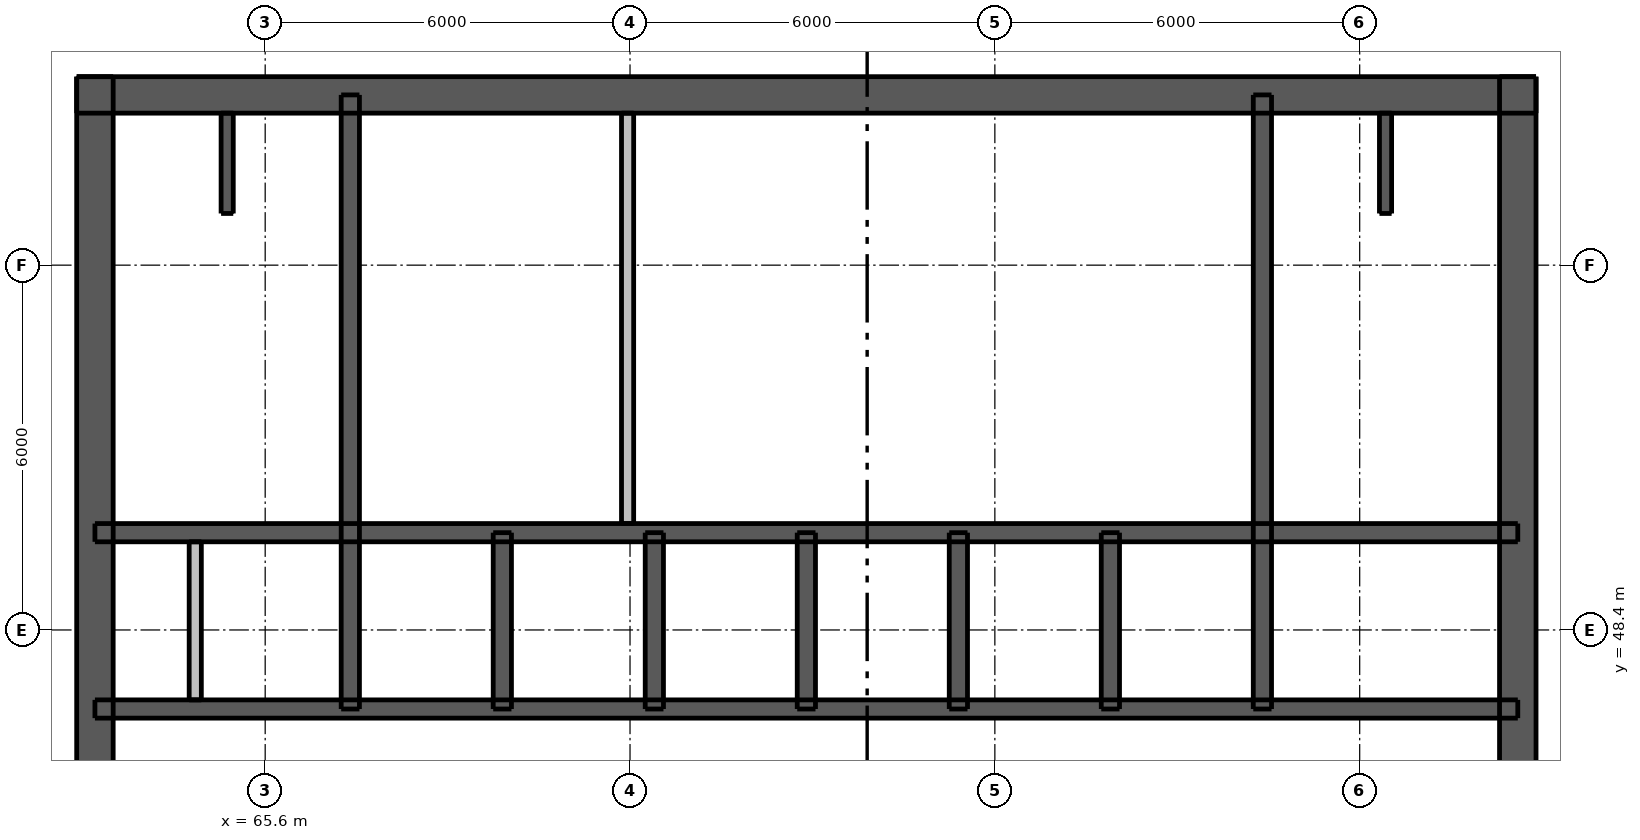
"""IFC4 building model, lengths in metres.
Left out: names, types, materials, properties, quantities, classifications, styles, units other than length and angle.
Written with IfcOpenShell. Run it as: python <this file> out.ifc"""

import sys

from ifc_helpers import new_model, si_unit, direction, frame, frame_2d, origin, place, context, subcontext, project, spatial, rectangle, extrude, element, fill, save


model = new_model("IFC4")
c1 = context("Model", 3, precision=1e-05, world=origin(), true_north=direction((0.0, 1.0)))
c2 = subcontext(c1, "Body", "Model", "MODEL_VIEW")
j1 = project(units=[si_unit("LENGTHUNIT", "METRE"), si_unit("PLANEANGLEUNIT", "RADIAN")], contexts=[c1])
p1 = place(None, origin())
s1 = spatial("IfcSite", under=j1, at=p1, CompositionType="ELEMENT")
p2 = place(p1, origin())
s2 = spatial("IfcBuilding", under=s1, at=p2, CompositionType="ELEMENT")
p3 = place(p2, frame((0.0, 0.0, 229.9)))
s3 = spatial("IfcBuildingStorey", under=s2, at=p3, CompositionType="ELEMENT", Elevation=229.9)
p4 = place(p3, frame((62.5, 57.2, 0.0), z_axis=(0.0, 0.0, 1.0), x_axis=(1.0, 0.0, 0.0)))
e1 = element("IfcWall", 1, at=p4, inside=s3, PredefinedType="SHEAR", context=c2, shape_type="SweptSolid", body=[
    extrude(rectangle(XDim=24.0, YDim=0.6, at=frame_2d((12.0, 0.0))), origin(), (0.0, 0.0, 1.0), 8.75),
])
p5 = place(p4, frame((19.85, 0.0, 0.0)))
e2 = element("IfcOpeningElement", 2, at=p5, cuts=e1, PredefinedType="OPENING", context=c2, shape_type="SweptSolid", body=[
    extrude(rectangle(XDim=1.1, YDim=2.1, at=frame_2d((0.55, 1.05))), frame((0.0, 0.31, 0.0), z_axis=(0.0, -1.0, 0.0), x_axis=(1.0, 0.0, 0.0)), (0.0, 0.0, 1.0), 0.62),
])
p6 = place(p4, frame((22.1, 0.0, 0.0)))
e3 = element("IfcOpeningElement", 3, at=p6, cuts=e1, PredefinedType="OPENING", context=c2, shape_type="SweptSolid", body=[
    extrude(rectangle(XDim=1.1, YDim=2.1, at=frame_2d((0.55, 1.05))), frame((0.0, 0.31, 0.0), z_axis=(0.0, -1.0, 0.0), x_axis=(1.0, 0.0, 0.0)), (0.0, 0.0, 1.0), 0.62),
])
p7 = place(p4, frame((0.8, 0.0, 0.0)))
e4 = element("IfcOpeningElement", 4, at=p7, cuts=e1, PredefinedType="OPENING", context=c2, shape_type="SweptSolid", body=[
    extrude(rectangle(XDim=1.1, YDim=2.1, at=frame_2d((0.55, 1.05))), frame((0.0, 0.31, 0.0), z_axis=(0.0, -1.0, 0.0), x_axis=(1.0, 0.0, 0.0)), (0.0, 0.0, 1.0), 0.62),
])
p8 = place(p4, frame((3.05, 0.0, 0.0)))
e5 = element("IfcOpeningElement", 5, at=p8, cuts=e1, PredefinedType="OPENING", context=c2, shape_type="SweptSolid", body=[
    extrude(rectangle(XDim=1.1, YDim=2.1, at=frame_2d((0.55, 1.05))), frame((0.0, 0.31, 0.0), z_axis=(0.0, -1.0, 0.0), x_axis=(1.0, 0.0, 0.0)), (0.0, 0.0, 1.0), 0.62),
])
p9 = place(p4, frame((6.405, 0.0, 0.0)))
e6 = element("IfcOpeningElement", 6, at=p9, cuts=e1, PredefinedType="OPENING", context=c2, shape_type="SweptSolid", body=[
    extrude(rectangle(XDim=0.9, YDim=2.1, at=frame_2d((0.45, 1.05))), frame((0.0, 0.31, 0.0), z_axis=(0.0, -1.0, 0.0), x_axis=(1.0, 0.0, 0.0)), (0.0, 0.0, 1.0), 0.62),
])
p10 = place(p4, frame((13.21, 0.0, 0.0)))
e7 = element("IfcOpeningElement", 7, at=p10, cuts=e1, PredefinedType="OPENING", context=c2, shape_type="SweptSolid", body=[
    extrude(rectangle(XDim=0.9, YDim=2.1, at=frame_2d((0.45, 1.05))), frame((0.0, 0.31, 0.0), z_axis=(0.0, -1.0, 0.0), x_axis=(1.0, 0.0, 0.0)), (0.0, 0.0, 1.0), 0.62),
])
p11 = place(p3, frame((62.8, 33.5, 0.0), z_axis=(0.0, 0.0, 1.0), x_axis=(0.0, 1.0, 0.0)))
e8 = element("IfcWall", 8, at=p11, inside=s3, PredefinedType="SHEAR", context=c2, shape_type="SweptSolid", body=[
    extrude(rectangle(XDim=24.0, YDim=0.6, at=frame_2d((12.0, 0.0))), origin(), (0.0, 0.0, 1.0), 8.75),
])
p12 = place(p11, frame((11.2, 0.0, 0.0)))
e9 = element("IfcOpeningElement", 9, at=p12, cuts=e8, PredefinedType="OPENING", context=c2, shape_type="SweptSolid", body=[
    extrude(rectangle(XDim=1.6, YDim=2.1, at=frame_2d((0.8, 1.05))), frame((0.0, 0.31, 0.0), z_axis=(0.0, -1.0, 0.0), x_axis=(1.0, 0.0, 0.0)), (0.0, 0.0, 1.0), 0.62),
])
p13 = place(p3, frame((86.2, 33.5, 0.0), z_axis=(0.0, 0.0, 1.0), x_axis=(0.0, 1.0, 0.0)))
e10 = element("IfcWall", 10, at=p13, inside=s3, PredefinedType="SHEAR", context=c2, shape_type="SweptSolid", body=[
    extrude(rectangle(XDim=24.0, YDim=0.6, at=frame_2d((12.0, 0.0))), origin(), (0.0, 0.0, 1.0), 8.75),
])
p14 = place(p13, frame((11.2, 0.0, 0.0)))
e11 = element("IfcOpeningElement", 11, at=p14, cuts=e10, PredefinedType="OPENING", context=c2, shape_type="SweptSolid", body=[
    extrude(rectangle(XDim=1.6, YDim=2.1, at=frame_2d((0.8, 1.05))), frame((0.0, 0.31, 0.0), z_axis=(0.0, -1.0, 0.0), x_axis=(1.0, 0.0, 0.0)), (0.0, 0.0, 1.0), 0.62),
])
p15 = place(p3, frame((62.8, 47.1, 0.0), z_axis=(0.0, 0.0, 1.0), x_axis=(1.0, 0.0, 0.0)))
e12 = element("IfcWall", 12, at=p15, inside=s3, PredefinedType="SHEAR", context=c2, shape_type="SweptSolid", body=[
    extrude(rectangle(XDim=23.4, YDim=0.3, at=frame_2d((11.7, 0.0))), origin(), (0.0, 0.0, 1.0), 8.75),
])
p16 = place(p15, frame((0.575, 0.0, 0.0)))
e13 = element("IfcOpeningElement", 13, at=p16, cuts=e12, PredefinedType="OPENING", context=c2, shape_type="SweptSolid", body=[
    extrude(rectangle(XDim=0.8, YDim=2.1, at=frame_2d((0.4, 1.05))), frame((0.0, 0.16, 0.0), z_axis=(0.0, -1.0, 0.0), x_axis=(1.0, 0.0, 0.0)), (0.0, 0.0, 1.0), 0.32),
])
p17 = place(p15, frame((2.4, 0.0, 0.0)))
e14 = element("IfcOpeningElement", 14, at=p17, cuts=e12, PredefinedType="OPENING", context=c2, shape_type="SweptSolid", body=[
    extrude(rectangle(XDim=0.9, YDim=2.1, at=frame_2d((0.45, 1.05))), frame((0.0, 0.16, 0.0), z_axis=(0.0, -1.0, 0.0), x_axis=(1.0, 0.0, 0.0)), (0.0, 0.0, 1.0), 0.32),
])
p18 = place(p15, frame((20.775, 0.0, 0.0)))
e15 = element("IfcOpeningElement", 15, at=p18, cuts=e12, PredefinedType="OPENING", context=c2, shape_type="SweptSolid", body=[
    extrude(rectangle(XDim=0.9, YDim=2.1, at=frame_2d((0.45, 1.05))), frame((0.0, 0.16, 0.0), z_axis=(0.0, -1.0, 0.0), x_axis=(1.0, 0.0, 0.0)), (0.0, 0.0, 1.0), 0.32),
])
p19 = place(p15, frame((4.9, 0.0, 0.0)))
e16 = element("IfcOpeningElement", 16, at=p19, cuts=e12, PredefinedType="OPENING", context=c2, shape_type="SweptSolid", body=[
    extrude(rectangle(XDim=1.1, YDim=2.1, at=frame_2d((0.55, 1.05))), frame((0.0, 0.16, 0.0), z_axis=(0.0, -1.0, 0.0), x_axis=(1.0, 0.0, 0.0)), (0.0, 0.0, 1.0), 0.32),
])
p20 = place(p15, frame((7.4, 0.0, 0.0)))
e17 = element("IfcOpeningElement", 17, at=p20, cuts=e12, PredefinedType="OPENING", context=c2, shape_type="SweptSolid", body=[
    extrude(rectangle(XDim=1.1, YDim=2.1, at=frame_2d((0.55, 1.05))), frame((0.0, 0.16, 0.0), z_axis=(0.0, -1.0, 0.0), x_axis=(1.0, 0.0, 0.0)), (0.0, 0.0, 1.0), 0.32),
])
p21 = place(p15, frame((9.9, 0.0, 0.0)))
e18 = element("IfcOpeningElement", 18, at=p21, cuts=e12, PredefinedType="OPENING", context=c2, shape_type="SweptSolid", body=[
    extrude(rectangle(XDim=1.1, YDim=2.1, at=frame_2d((0.55, 1.05))), frame((0.0, 0.16, 0.0), z_axis=(0.0, -1.0, 0.0), x_axis=(1.0, 0.0, 0.0)), (0.0, 0.0, 1.0), 0.32),
])
p22 = place(p15, frame((12.4, 0.0, 0.0)))
e19 = element("IfcOpeningElement", 19, at=p22, cuts=e12, PredefinedType="OPENING", context=c2, shape_type="SweptSolid", body=[
    extrude(rectangle(XDim=1.1, YDim=2.1, at=frame_2d((0.55, 1.05))), frame((0.0, 0.16, 0.0), z_axis=(0.0, -1.0, 0.0), x_axis=(1.0, 0.0, 0.0)), (0.0, 0.0, 1.0), 0.32),
])
p23 = place(p15, frame((14.9, 0.0, 0.0)))
e20 = element("IfcOpeningElement", 20, at=p23, cuts=e12, PredefinedType="OPENING", context=c2, shape_type="SweptSolid", body=[
    extrude(rectangle(XDim=1.1, YDim=2.1, at=frame_2d((0.55, 1.05))), frame((0.0, 0.16, 0.0), z_axis=(0.0, -1.0, 0.0), x_axis=(1.0, 0.0, 0.0)), (0.0, 0.0, 1.0), 0.32),
])
p24 = place(p15, frame((17.4, 0.0, 0.0)))
e21 = element("IfcOpeningElement", 21, at=p24, cuts=e12, PredefinedType="OPENING", context=c2, shape_type="SweptSolid", body=[
    extrude(rectangle(XDim=1.1, YDim=2.1, at=frame_2d((0.55, 1.05))), frame((0.0, 0.16, 0.0), z_axis=(0.0, -1.0, 0.0), x_axis=(1.0, 0.0, 0.0)), (0.0, 0.0, 1.0), 0.32),
])
p25 = place(p3, frame((62.8, 50.0, 0.0), z_axis=(0.0, 0.0, 1.0), x_axis=(1.0, 0.0, 0.0)))
e22 = element("IfcWall", 22, at=p25, inside=s3, PredefinedType="SHEAR", context=c2, shape_type="SweptSolid", body=[
    extrude(rectangle(XDim=23.4, YDim=0.3, at=frame_2d((11.7, 0.0))), origin(), (0.0, 0.0, 1.0), 8.75),
])
for number, where, z_axis, x_axis in (
    (23, (67.0, 47.1, 0.0), (0.0, 0.0, 1.0), (0.0, 1.0, 0.0)),
    (24, (82.0, 47.1, 0.0), (0.0, 0.0, 1.0), (0.0, 1.0, 0.0)),
):
    element("IfcWall", number, at=place(p3, frame(where, z_axis=z_axis, x_axis=x_axis)), inside=s3, PredefinedType="SHEAR", context=c2, shape_type="SweptSolid", body=[
        extrude(rectangle(XDim=10.1, YDim=0.3, at=frame_2d((5.05, 0.0))), origin(), (0.0, 0.0, 1.0), 8.75),
    ])
for number, where, z_axis, x_axis in (
    (25, (69.5, 47.1, 0.0), (0.0, 0.0, 1.0), (0.0, 1.0, 0.0)),
    (26, (72.0, 47.1, 0.0), (0.0, 0.0, 1.0), (0.0, 1.0, 0.0)),
    (27, (74.5, 47.1, 0.0), (0.0, 0.0, 1.0), (0.0, 1.0, 0.0)),
    (28, (77.0, 47.1, 0.0), (0.0, 0.0, 1.0), (0.0, 1.0, 0.0)),
    (29, (79.5, 47.1, 0.0), (0.0, 0.0, 1.0), (0.0, 1.0, 0.0)),
):
    element("IfcWall", number, at=place(p3, frame(where, z_axis=z_axis, x_axis=x_axis)), inside=s3, PredefinedType="SHEAR", context=c2, shape_type="SweptSolid", body=[
        extrude(rectangle(XDim=2.9, YDim=0.3, at=frame_2d((1.45, 0.0))), origin(), (0.0, 0.0, 1.0), 8.75),
    ])
p26 = place(p3, frame((64.45, 47.25, 0.0), z_axis=(0.0, 0.0, 1.0), x_axis=(0.0, 1.0, 0.0)))
e30 = element("IfcWall", 30, at=p26, inside=s3, PredefinedType="PLUMBINGWALL", context=c2, shape_type="SweptSolid", body=[
    extrude(rectangle(XDim=2.6, YDim=0.2, at=frame_2d((1.3, 0.0))), origin(), (0.0, 0.0, 1.0), 8.75),
])
p27 = place(p3, frame((71.56, 50.15, 0.0), z_axis=(0.0, 0.0, 1.0), x_axis=(0.0, 1.0, 0.0)))
e31 = element("IfcWall", 31, at=p27, inside=s3, PredefinedType="PLUMBINGWALL", context=c2, shape_type="SweptSolid", body=[
    extrude(rectangle(XDim=6.75, YDim=0.2, at=frame_2d((3.375, 0.0))), origin(), (0.0, 0.0, 1.0), 8.75),
])
for number, where, z_axis, x_axis in (
    (32, (84.025, 56.9, 0.0), (0.0, 0.0, 1.0), (0.0, -1.0, 0.0)),
    (33, (64.975, 56.9, 0.0), (0.0, 0.0, 1.0), (0.0, -1.0, 0.0)),
):
    element("IfcWall", number, at=place(p3, frame(where, z_axis=z_axis, x_axis=x_axis)), inside=s3, PredefinedType="SHEAR", context=c2, shape_type="SweptSolid", body=[
        extrude(rectangle(XDim=1.65, YDim=0.2, at=frame_2d((0.825, 0.0))), origin(), (0.0, 0.0, 1.0), 8.75),
    ])
p28 = place(p5, origin())
e34 = element("IfcDoor", 34, at=p28, inside=s3, OperationType="SINGLE_SWING_RIGHT", PredefinedType="DOOR", context=c2, shape_type="SweptSolid", body=[
    extrude(rectangle(XDim=1.1, YDim=2.1, at=frame_2d((0.55, 1.05))), frame((0.0, -0.237, 0.0), z_axis=(0.0, -1.0, 0.0), x_axis=(1.0, 0.0, 0.0)), (0.0, 0.0, 1.0), 0.05),
])
fill(e2, e34)
p29 = place(p6, origin())
e35 = element("IfcDoor", 35, at=p29, inside=s3, OperationType="SINGLE_SWING_RIGHT", PredefinedType="DOOR", context=c2, shape_type="SweptSolid", body=[
    extrude(rectangle(XDim=1.1, YDim=2.1, at=frame_2d((0.55, 1.05))), frame((0.0, -0.237, 0.0), z_axis=(0.0, -1.0, 0.0), x_axis=(1.0, 0.0, 0.0)), (0.0, 0.0, 1.0), 0.05),
])
fill(e3, e35)
p30 = place(p7, origin())
e36 = element("IfcDoor", 36, at=p30, inside=s3, OperationType="SINGLE_SWING_LEFT", PredefinedType="DOOR", context=c2, shape_type="SweptSolid", body=[
    extrude(rectangle(XDim=1.1, YDim=2.1, at=frame_2d((0.55, 1.05))), frame((0.0, -0.237, 0.0), z_axis=(0.0, -1.0, 0.0), x_axis=(1.0, 0.0, 0.0)), (0.0, 0.0, 1.0), 0.05),
])
fill(e4, e36)
p31 = place(p8, origin())
e37 = element("IfcDoor", 37, at=p31, inside=s3, OperationType="SINGLE_SWING_LEFT", PredefinedType="DOOR", context=c2, shape_type="SweptSolid", body=[
    extrude(rectangle(XDim=1.1, YDim=2.1, at=frame_2d((0.55, 1.05))), frame((0.0, -0.237, 0.0), z_axis=(0.0, -1.0, 0.0), x_axis=(1.0, 0.0, 0.0)), (0.0, 0.0, 1.0), 0.05),
])
fill(e5, e37)
p32 = place(p12, origin())
e38 = element("IfcDoor", 38, at=p32, inside=s3, OperationType="DOUBLE_DOOR_SINGLE_SWING", PredefinedType="DOOR", context=c2, shape_type="SweptSolid", body=[
    extrude(rectangle(XDim=1.6, YDim=2.1, at=frame_2d((0.8, 1.05))), frame((0.0, -0.237, 0.0), z_axis=(0.0, -1.0, 0.0), x_axis=(1.0, 0.0, 0.0)), (0.0, 0.0, 1.0), 0.05),
])
fill(e9, e38)
p33 = place(p14, origin())
e39 = element("IfcDoor", 39, at=p33, inside=s3, OperationType="DOUBLE_DOOR_SINGLE_SWING", PredefinedType="DOOR", context=c2, shape_type="SweptSolid", body=[
    extrude(rectangle(XDim=1.6, YDim=2.1, at=frame_2d((0.8, 1.05))), frame((0.0, 0.288, 0.0), z_axis=(0.0, -1.0, 0.0), x_axis=(1.0, 0.0, 0.0)), (0.0, 0.0, 1.0), 0.05),
])
fill(e11, e39)
p34 = place(p16, origin())
e40 = element("IfcDoor", 40, at=p34, inside=s3, OperationType="SINGLE_SWING_LEFT", PredefinedType="DOOR", context=c2, shape_type="SweptSolid", body=[
    extrude(rectangle(XDim=0.8, YDim=2.1, at=frame_2d((0.4, 1.05))), frame((0.0, 0.138, 0.0), z_axis=(0.0, -1.0, 0.0), x_axis=(1.0, 0.0, 0.0)), (0.0, 0.0, 1.0), 0.05),
])
fill(e13, e40)
p35 = place(p17, origin())
e41 = element("IfcDoor", 41, at=p35, inside=s3, OperationType="SINGLE_SWING_RIGHT", PredefinedType="DOOR", context=c2, shape_type="SweptSolid", body=[
    extrude(rectangle(XDim=0.9, YDim=2.1, at=frame_2d((0.45, 1.05))), frame((0.0, 0.138, 0.0), z_axis=(0.0, -1.0, 0.0), x_axis=(1.0, 0.0, 0.0)), (0.0, 0.0, 1.0), 0.05),
])
fill(e14, e41)
p36 = place(p18, origin())
e42 = element("IfcDoor", 42, at=p36, inside=s3, OperationType="SINGLE_SWING_LEFT", PredefinedType="DOOR", context=c2, shape_type="SweptSolid", body=[
    extrude(rectangle(XDim=0.9, YDim=2.1, at=frame_2d((0.45, 1.05))), frame((0.0, 0.138, 0.0), z_axis=(0.0, -1.0, 0.0), x_axis=(1.0, 0.0, 0.0)), (0.0, 0.0, 1.0), 0.05),
])
fill(e15, e42)
p37 = place(p9, origin())
e43 = element("IfcDoor", 43, at=p37, inside=s3, OperationType="SINGLE_SWING_RIGHT", PredefinedType="DOOR", context=c2, shape_type="SweptSolid", body=[
    extrude(rectangle(XDim=0.9, YDim=2.1, at=frame_2d((0.45, 1.05))), frame((0.0, -0.237, 0.0), z_axis=(0.0, -1.0, 0.0), x_axis=(1.0, 0.0, 0.0)), (0.0, 0.0, 1.0), 0.05),
])
fill(e6, e43)
p38 = place(p10, origin())
e44 = element("IfcDoor", 44, at=p38, inside=s3, OperationType="SINGLE_SWING_RIGHT", PredefinedType="DOOR", context=c2, shape_type="SweptSolid", body=[
    extrude(rectangle(XDim=0.9, YDim=2.1, at=frame_2d((0.45, 1.05))), frame((0.0, -0.237, 0.0), z_axis=(0.0, -1.0, 0.0), x_axis=(1.0, 0.0, 0.0)), (0.0, 0.0, 1.0), 0.05),
])
fill(e7, e44)
p39 = place(p19, origin())
e45 = element("IfcDoor", 45, at=p39, inside=s3, OperationType="DOUBLE_DOOR_SLIDING", PredefinedType="DOOR", context=c2, shape_type="SweptSolid", body=[
    extrude(rectangle(XDim=1.1, YDim=2.1, at=frame_2d((0.55, 1.05))), frame((0.0, 0.025, 0.0), z_axis=(0.0, -1.0, 0.0), x_axis=(1.0, 0.0, 0.0)), (0.0, 0.0, 1.0), 0.05),
])
fill(e16, e45)
p40 = place(p20, origin())
e46 = element("IfcDoor", 46, at=p40, inside=s3, OperationType="DOUBLE_DOOR_SLIDING", PredefinedType="DOOR", context=c2, shape_type="SweptSolid", body=[
    extrude(rectangle(XDim=1.1, YDim=2.1, at=frame_2d((0.55, 1.05))), frame((0.0, 0.025, 0.0), z_axis=(0.0, -1.0, 0.0), x_axis=(1.0, 0.0, 0.0)), (0.0, 0.0, 1.0), 0.05),
])
fill(e17, e46)
p41 = place(p21, origin())
e47 = element("IfcDoor", 47, at=p41, inside=s3, OperationType="DOUBLE_DOOR_SLIDING", PredefinedType="DOOR", context=c2, shape_type="SweptSolid", body=[
    extrude(rectangle(XDim=1.1, YDim=2.1, at=frame_2d((0.55, 1.05))), frame((0.0, 0.025, 0.0), z_axis=(0.0, -1.0, 0.0), x_axis=(1.0, 0.0, 0.0)), (0.0, 0.0, 1.0), 0.05),
])
fill(e18, e47)
p42 = place(p22, origin())
e48 = element("IfcDoor", 48, at=p42, inside=s3, OperationType="DOUBLE_DOOR_SLIDING", PredefinedType="DOOR", context=c2, shape_type="SweptSolid", body=[
    extrude(rectangle(XDim=1.1, YDim=2.1, at=frame_2d((0.55, 1.05))), frame((0.0, 0.025, 0.0), z_axis=(0.0, -1.0, 0.0), x_axis=(1.0, 0.0, 0.0)), (0.0, 0.0, 1.0), 0.05),
])
fill(e19, e48)
p43 = place(p23, origin())
e49 = element("IfcDoor", 49, at=p43, inside=s3, OperationType="DOUBLE_DOOR_SLIDING", PredefinedType="DOOR", context=c2, shape_type="SweptSolid", body=[
    extrude(rectangle(XDim=1.1, YDim=2.1, at=frame_2d((0.55, 1.05))), frame((0.0, 0.025, 0.0), z_axis=(0.0, -1.0, 0.0), x_axis=(1.0, 0.0, 0.0)), (0.0, 0.0, 1.0), 0.05),
])
fill(e20, e49)
p44 = place(p24, origin())
e50 = element("IfcDoor", 50, at=p44, inside=s3, OperationType="DOUBLE_DOOR_SLIDING", PredefinedType="DOOR", context=c2, shape_type="SweptSolid", body=[
    extrude(rectangle(XDim=1.1, YDim=2.1, at=frame_2d((0.55, 1.05))), frame((0.0, 0.025, 0.0), z_axis=(0.0, -1.0, 0.0), x_axis=(1.0, 0.0, 0.0)), (0.0, 0.0, 1.0), 0.05),
])
fill(e21, e50)
save(model, sys.argv[1])
